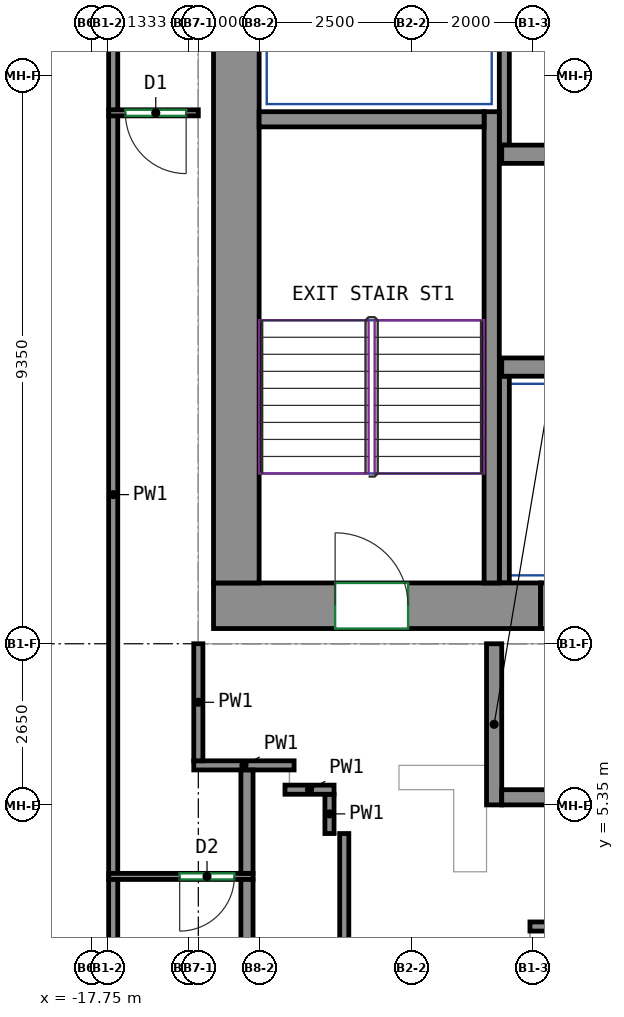
"""IFC4 building model, lengths in metres.
Left out: names, types, materials, properties, quantities, classifications, styles, units other than length and angle.
Written with IfcOpenShell. Run it as: python <this file> out.ifc"""

import sys

from ifc_helpers import new_model, si_unit, direction, frame, frame_2d, origin, place, context, subcontext, project, spatial, rectangle, extrude, source, transform, mapped, element, fill, save


model = new_model("IFC4")
c1 = context("Model", 3, precision=1e-05, world=origin(), true_north=direction((0.0, 1.0)))
c2 = subcontext(c1, "Body", "Model", "MODEL_VIEW")
j1 = project(units=[si_unit("LENGTHUNIT", "METRE"), si_unit("PLANEANGLEUNIT", "RADIAN")], contexts=[c1])
p1 = place(None, origin())
s1 = spatial("IfcSite", under=j1, at=p1, CompositionType="ELEMENT")
p2 = place(p1, origin())
s2 = spatial("IfcBuilding", under=s1, at=p2, CompositionType="ELEMENT")
p3 = place(p2, frame((0.0, 0.0, 249.2)))
s3 = spatial("IfcBuildingStorey", under=s2, at=p3, CompositionType="ELEMENT", Elevation=249.2)
m1 = source(origin(), c2, "Body", "SweptSolid", [
    extrude(rectangle(XDim=5.38, YDim=0.75, at=frame_2d((2.69, 0.0))), origin(), (0.0, 0.0, 1.0), 3.12),
])
p4 = place(p3, frame((-15.75, 8.625, 0.0), z_axis=(0.0, 0.0, 1.0), x_axis=(1.0, 0.0, 0.0)))
e1 = element("IfcWall", 1, at=p4, inside=s3, PredefinedType="SHEAR", context=c2, shape_type="MappedRepresentation", body=[
    mapped(m1, transform((0.0, 0.0, 0.0))),
])
p5 = place(p4, frame((2.0, 0.0, 0.0)))
e2 = element("IfcOpeningElement", 2, at=p5, cuts=e1, PredefinedType="OPENING", context=c2, shape_type="SweptSolid", body=[
    extrude(rectangle(XDim=1.2, YDim=2.1, at=frame_2d((0.6, 1.05))), frame((0.0, 0.385, 0.0), z_axis=(0.0, -1.0, 0.0), x_axis=(1.0, 0.0, 0.0)), (0.0, 0.0, 1.0), 0.77),
])
m2 = source(origin(), c2, "Body", "SweptSolid", [
    extrude(rectangle(XDim=12.0, YDim=0.75, at=frame_2d((6.0, 0.0))), origin(), (0.0, 0.0, 1.0), 3.12),
])
p6 = place(p3, frame((-15.375, 9.0, 0.0), z_axis=(0.0, 0.0, 1.0), x_axis=(0.0, 1.0, 0.0)))
e3 = element("IfcWall", 3, at=p6, inside=s3, PredefinedType="SHEAR", context=c2, shape_type="MappedRepresentation", body=[
    mapped(m2, transform((0.0, 0.0, 0.0))),
])
m3 = source(origin(), c2, "Body", "SweptSolid", [
    extrude(rectangle(XDim=7.75, YDim=0.25, at=frame_2d((3.875, 0.0))), origin(), (0.0, 0.0, 1.0), 3.12),
])
p7 = place(p3, frame((-11.175, 9.0, 0.0), z_axis=(0.0, 0.0, 1.0), x_axis=(0.0, 1.0, 0.0)))
e4 = element("IfcWall", 4, at=p7, inside=s3, PredefinedType="SHEAR", context=c2, shape_type="MappedRepresentation", body=[
    mapped(m3, transform((0.0, 0.0, 0.0))),
])
m4 = source(origin(), c2, "Body", "SweptSolid", [
    extrude(rectangle(XDim=3.7, YDim=0.25, at=frame_2d((1.85, 0.0))), origin(), (0.0, 0.0, 1.0), 3.12),
])
p8 = place(p3, frame((-15.0, 16.625, 0.0), z_axis=(0.0, 0.0, 1.0), x_axis=(1.0, 0.0, 0.0)))
e5 = element("IfcWall", 5, at=p8, inside=s3, PredefinedType="SHEAR", context=c2, shape_type="MappedRepresentation", body=[
    mapped(m4, transform((0.0, 0.0, 0.0))),
])
m5 = source(origin(), c2, "Body", "SweptSolid", [
    extrude(rectangle(XDim=6.0, YDim=0.3, at=frame_2d((3.0, 0.0))), origin(), (0.0, 0.0, 1.0), 3.12),
])
p9 = place(p3, frame((-11.01, 12.55, 0.0), z_axis=(0.0, 0.0, 1.0), x_axis=(1.0, 0.0, 0.0)))
e6 = element("IfcWall", 6, at=p9, inside=s3, PredefinedType="SHEAR", context=c2, shape_type="MappedRepresentation", body=[
    mapped(m5, transform((0.0, 0.0, 0.0))),
])
m6 = source(origin(), c2, "Body", "SweptSolid", [
    extrude(rectangle(XDim=22.08, YDim=0.3, at=frame_2d((11.04, 0.0))), origin(), (0.0, 0.0, 1.0), 3.12),
])
p10 = place(p3, frame((-11.01, 16.05, 0.0), z_axis=(0.0, 0.0, 1.0), x_axis=(1.0, 0.0, 0.0)))
e7 = element("IfcWall", 7, at=p10, inside=s3, PredefinedType="SHEAR", context=c2, shape_type="MappedRepresentation", body=[
    mapped(m6, transform((0.0, 0.0, 0.0))),
])
m7 = source(origin(), c2, "Body", "SweptSolid", [
    extrude(rectangle(XDim=2.65, YDim=0.25, at=frame_2d((1.325, 0.0))), origin(), (0.0, 0.0, 1.0), 2.57),
])
p11 = place(p3, frame((-11.135, 5.35, 0.0), z_axis=(0.0, 0.0, 1.0), x_axis=(0.0, 1.0, 0.0)))
e8 = element("IfcWall", 8, at=p11, inside=s3, PredefinedType="PARTITIONING", context=c2, shape_type="MappedRepresentation", body=[
    mapped(m7, transform((0.0, 0.0, 0.0))),
])
m8 = source(origin(), c2, "Body", "SweptSolid", [
    extrude(rectangle(XDim=5.36, YDim=0.25, at=frame_2d((2.68, 0.0))), origin(), (0.0, 0.0, 1.0), 3.12),
])
p12 = place(p3, frame((-11.01, 5.475, 0.0), z_axis=(0.0, 0.0, 1.0), x_axis=(1.0, 0.0, 0.0)))
e9 = element("IfcWall", 9, at=p12, inside=s3, PredefinedType="PARTITIONING", context=c2, shape_type="MappedRepresentation", body=[
    mapped(m8, transform((0.0, 0.0, 0.0))),
])
p13 = place(p12, frame((2.28, 0.0, 0.0)))
e10 = element("IfcOpeningElement", 10, at=p13, cuts=e9, PredefinedType="OPENING", context=c2, shape_type="SweptSolid", body=[
    extrude(rectangle(XDim=0.8, YDim=2.0, at=frame_2d((0.4, 1.0))), frame((0.0, 0.135, 0.0), z_axis=(0.0, -1.0, 0.0), x_axis=(1.0, 0.0, 0.0)), (0.0, 0.0, 1.0), 0.27),
])
m9 = source(origin(), c2, "Body", "SweptSolid", [
    extrude(rectangle(XDim=4.8, YDim=0.165, at=frame_2d((2.4, 0.0))), origin(), (0.0, 0.0, 1.0), 3.12),
])
p14 = place(p3, frame((-10.968, 16.2, 0.0), z_axis=(0.0, 0.0, 1.0), x_axis=(0.0, 1.0, 0.0)))
e11 = element("IfcWall", 11, at=p14, inside=s3, PredefinedType="PARTITIONING", context=c2, shape_type="MappedRepresentation", body=[
    mapped(m9, transform((0.0, 0.0, 0.0))),
])
m10 = source(origin(), c2, "Body", "SweptSolid", [
    extrude(rectangle(XDim=3.4, YDim=0.165, at=frame_2d((1.7, 0.0))), origin(), (0.0, 0.0, 1.0), 3.12),
])
p15 = place(p3, frame((-10.968, 9.0, 0.0), z_axis=(0.0, 0.0, 1.0), x_axis=(0.0, 1.0, 0.0)))
e12 = element("IfcWall", 12, at=p15, inside=s3, PredefinedType="PARTITIONING", context=c2, shape_type="MappedRepresentation", body=[
    mapped(m10, transform((0.0, 0.0, 0.0))),
])
m11 = source(origin(), c2, "Body", "SweptSolid", [
    extrude(rectangle(XDim=1.4, YDim=0.75, at=frame_2d((0.7, 0.0))), origin(), (0.0, 0.0, 1.0), 2.7),
])
p16 = place(p3, frame((-10.37, 8.625, 0.0), z_axis=(0.0, 0.0, 1.0), x_axis=(1.0, 0.0, 0.0)))
e13 = element("IfcWall", 13, at=p16, inside=s3, PredefinedType="PARTITIONING", context=c2, shape_type="MappedRepresentation", body=[
    mapped(m11, transform((0.0, 0.0, 0.0))),
])
p17 = place(p16, frame((0.25, 0.0, 0.0)))
e14 = element("IfcOpeningElement", 14, at=p17, cuts=e13, PredefinedType="OPENING", context=c2, shape_type="SweptSolid", body=[
    extrude(rectangle(XDim=0.9, YDim=2.1, at=frame_2d((0.45, 1.05))), frame((0.0, 0.385, 0.0), z_axis=(0.0, -1.0, 0.0), x_axis=(1.0, 0.0, 0.0)), (0.0, 0.0, 1.0), 0.77),
])
p18 = place(p3, frame((-17.4, -1.791, 0.0), z_axis=(0.0, 0.0, 1.0), x_axis=(0.0, 1.0, 0.0)))
e15 = element("IfcWall", 15, at=p18, inside=s3, PredefinedType="PARTITIONING", context=c2, shape_type="SweptSolid", body=[
    extrude(rectangle(XDim=5.925, YDim=0.15, at=frame_2d((2.962, 0.0))), origin(), (0.0, 0.0, 1.0), 3.12),
])
p19 = place(p3, frame((-17.4, 4.214, 0.0), z_axis=(0.0, 0.0, 1.0), x_axis=(0.0, 1.0, 0.0)))
e16 = element("IfcWall", 16, at=p19, inside=s3, PredefinedType="PARTITIONING", context=c2, shape_type="SweptSolid", body=[
    extrude(rectangle(XDim=12.477, YDim=0.15, at=frame_2d((6.238, 0.0))), origin(), (0.0, 0.0, 1.0), 3.12),
])
p20 = place(p3, frame((-16.075, 6.0, 0.0), z_axis=(0.0, 0.0, 1.0), x_axis=(1.0, 0.0, 0.0)))
e17 = element("IfcWall", 17, at=p20, inside=s3, PredefinedType="PARTITIONING", context=c2, shape_type="SweptSolid", body=[
    extrude(rectangle(XDim=1.65, YDim=0.15, at=frame_2d((0.825, 0.0))), origin(), (0.0, 0.0, 1.0), 3.12),
])
p21 = place(p3, frame((-16.0, 6.075, 0.0), z_axis=(0.0, 0.0, 1.0), x_axis=(0.0, 1.0, 0.0)))
e18 = element("IfcWall", 18, at=p21, inside=s3, PredefinedType="PARTITIONING", context=c2, shape_type="SweptSolid", body=[
    extrude(rectangle(XDim=1.925, YDim=0.15, at=frame_2d((0.962, 0.0))), origin(), (0.0, 0.0, 1.0), 3.12),
])
p22 = place(p3, frame((-17.4, 16.771, 0.0), z_axis=(0.0, 0.0, 1.0), x_axis=(0.0, 1.0, 0.0)))
e19 = element("IfcWall", 19, at=p22, inside=s3, PredefinedType="PARTITIONING", context=c2, shape_type="SweptSolid", body=[
    extrude(rectangle(XDim=4.254, YDim=0.15, at=frame_2d((2.127, 0.0))), origin(), (0.0, 0.0, 1.0), 3.12),
])
p23 = place(p3, frame((-13.6, 4.879, 0.0), z_axis=(0.0, 0.0, 1.0), x_axis=(0.0, -1.0, 0.0)))
e20 = element("IfcWall", 20, at=p23, inside=s3, PredefinedType="PARTITIONING", context=c2, shape_type="SweptSolid", body=[
    extrude(rectangle(XDim=11.004, YDim=0.15, at=frame_2d((5.502, 0.0))), origin(), (0.0, 0.0, 1.0), 3.12),
])
p24 = place(p23, frame((8.904, 0.0, 0.0)))
e21 = element("IfcOpeningElement", 21, at=p24, cuts=e20, PredefinedType="OPENING", context=c2, shape_type="SweptSolid", body=[
    extrude(rectangle(XDim=0.9, YDim=2.1, at=frame_2d((0.45, 1.05))), frame((0.0, 0.085, 0.0), z_axis=(0.0, -1.0, 0.0), x_axis=(1.0, 0.0, 0.0)), (0.0, 0.0, 1.0), 0.17),
])
p25 = place(p3, frame((-13.843, 5.525, 0.0), z_axis=(0.0, 0.0, 1.0), x_axis=(0.0, -1.0, 0.0)))
e22 = element("IfcWall", 22, at=p25, inside=s3, PredefinedType="PARTITIONING", context=c2, shape_type="SweptSolid", body=[
    extrude(rectangle(XDim=0.646, YDim=0.15, at=frame_2d((0.323, 0.0))), origin(), (0.0, 0.0, 1.0), 3.12),
])
p26 = place(p3, frame((-14.575, 5.6, 0.0), z_axis=(0.0, 0.0, 1.0), x_axis=(1.0, 0.0, 0.0)))
e23 = element("IfcWall", 23, at=p26, inside=s3, PredefinedType="PARTITIONING", context=c2, shape_type="SweptSolid", body=[
    extrude(rectangle(XDim=0.807, YDim=0.15, at=frame_2d((0.403, 0.0))), origin(), (0.0, 0.0, 1.0), 3.12),
])
p27 = place(p3, frame((-10.546, 3.35, 0.0), z_axis=(0.0, 0.0, 1.0), x_axis=(1.0, 0.0, 0.0)))
e24 = element("IfcWall", 24, at=p27, inside=s3, PredefinedType="PARTITIONING", context=c2, shape_type="SweptSolid", body=[
    extrude(rectangle(XDim=3.896, YDim=0.15, at=frame_2d((1.948, 0.0))), origin(), (0.0, 0.0, 1.0), 3.12),
])
p28 = place(p3, frame((-15.1, 4.174, 0.0), z_axis=(0.0, 0.0, 1.0), x_axis=(-1.0, 0.0, 0.0)))
e25 = element("IfcWall", 25, at=p28, inside=s3, PredefinedType="PARTITIONING", context=c2, shape_type="SweptSolid", body=[
    extrude(rectangle(XDim=2.373, YDim=0.1, at=frame_2d((1.187, 0.0))), origin(), (0.0, 0.0, 1.0), 3.12),
])
p29 = place(p28, frame((0.307, 0.0, 0.0)))
e26 = element("IfcOpeningElement", 26, at=p29, cuts=e25, PredefinedType="OPENING", context=c2, shape_type="SweptSolid", body=[
    extrude(rectangle(XDim=0.9, YDim=2.1, at=frame_2d((0.45, 1.05))), frame((0.0, 0.06, 0.0), z_axis=(0.0, -1.0, 0.0), x_axis=(1.0, 0.0, 0.0)), (0.0, 0.0, 1.0), 0.12),
])
p30 = place(p3, frame((-15.2, -1.781, 0.0), z_axis=(0.0, 0.0, 1.0), x_axis=(0.0, 1.0, 0.0)))
e27 = element("IfcWall", 27, at=p30, inside=s3, PredefinedType="PARTITIONING", context=c2, shape_type="SweptSolid", body=[
    extrude(rectangle(XDim=5.905, YDim=0.2, at=frame_2d((2.953, 0.0))), origin(), (0.0, 0.0, 1.0), 3.12),
])
p31 = place(p3, frame((-16.0, 16.731, 0.0), z_axis=(0.0, 0.0, 1.0), x_axis=(-1.0, 0.0, 0.0)))
e28 = element("IfcWall", 28, at=p31, inside=s3, PredefinedType="PARTITIONING", context=c2, shape_type="SweptSolid", body=[
    extrude(rectangle(XDim=1.473, YDim=0.1, at=frame_2d((0.736, 0.0))), origin(), (0.0, 0.0, 1.0), 3.12),
])
p32 = place(p31, frame((0.2, 0.0, 0.0)))
e29 = element("IfcOpeningElement", 29, at=p32, cuts=e28, PredefinedType="OPENING", context=c2, shape_type="SweptSolid", body=[
    extrude(rectangle(XDim=1.0, YDim=2.1, at=frame_2d((0.5, 1.05))), frame((0.0, 0.06, 0.0), z_axis=(0.0, -1.0, 0.0), x_axis=(1.0, 0.0, 0.0)), (0.0, 0.0, 1.0), 0.12),
])
p33 = place(p3, frame((-15.2, 4.224, 0.0), z_axis=(0.0, 0.0, 1.0), x_axis=(0.0, 1.0, 0.0)))
e30 = element("IfcWall", 30, at=p33, inside=s3, PredefinedType="PARTITIONING", context=c2, shape_type="SweptSolid", body=[
    extrude(rectangle(XDim=1.699, YDim=0.2, at=frame_2d((0.85, 0.0))), origin(), (0.0, 0.0, 1.0), 3.12),
])
p34 = place(p5, origin())
e31 = element("IfcDoor", 31, at=p34, inside=s3, OperationType="DOUBLE_DOOR_SINGLE_SWING", PredefinedType="DOOR", context=c2, shape_type="SweptSolid", body=[
    extrude(rectangle(XDim=1.2, YDim=2.1, at=frame_2d((0.6, 1.05))), frame((0.0, 0.28, 0.0), z_axis=(0.0, -1.0, 0.0), x_axis=(1.0, 0.0, 0.0)), (0.0, 0.0, 1.0), 0.05),
])
fill(e2, e31)
p35 = place(p29, origin())
e32 = element("IfcDoor", 32, at=p35, inside=s3, OperationType="SINGLE_SWING_RIGHT", PredefinedType="DOOR", context=c2, shape_type="SweptSolid", body=[
    extrude(rectangle(XDim=0.9, YDim=2.1, at=frame_2d((0.45, 1.05))), frame((0.0, 0.025, 0.0), z_axis=(0.0, -1.0, 0.0), x_axis=(1.0, 0.0, 0.0)), (0.0, 0.0, 1.0), 0.05),
])
fill(e26, e32)
p36 = place(p32, origin())
e33 = element("IfcDoor", 33, at=p36, inside=s3, OperationType="SINGLE_SWING_LEFT", PredefinedType="DOOR", context=c2, shape_type="SweptSolid", body=[
    extrude(rectangle(XDim=1.0, YDim=2.1, at=frame_2d((0.5, 1.05))), frame((0.0, 0.025, 0.0), z_axis=(0.0, -1.0, 0.0), x_axis=(1.0, 0.0, 0.0)), (0.0, 0.0, 1.0), 0.05),
])
fill(e29, e33)
save(model, sys.argv[1])
